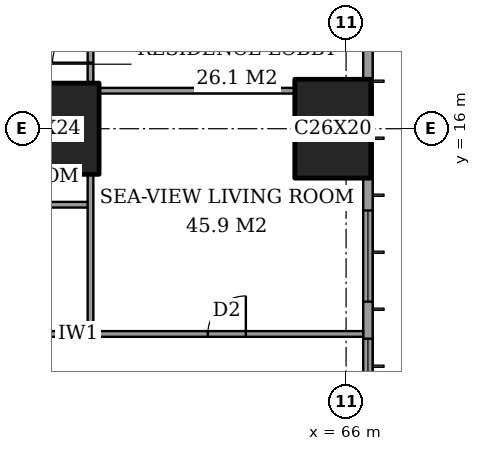
"""IFC4 building model, lengths in metres.
Left out: names, types, materials, properties, quantities, classifications, styles, units other than length and angle.
Written with IfcOpenShell. Run it as: python <this file> out.ifc"""

import sys

from ifc_helpers import new_model, si_unit, direction, frame, frame_2d, origin, origin_2d, place, context, subcontext, project, spatial, rectangle, extrude, element, fill, save


model = new_model("IFC4")
c1 = context("Model", 3, precision=1e-05, world=origin(), true_north=direction((0.0, 1.0)))
c2 = subcontext(c1, "Body", "Model", "MODEL_VIEW")
j1 = project(units=[si_unit("LENGTHUNIT", "METRE"), si_unit("PLANEANGLEUNIT", "RADIAN")], contexts=[c1])
p1 = place(None, origin())
s1 = spatial("IfcSite", under=j1, at=p1, CompositionType="ELEMENT")
p2 = place(p1, origin())
s2 = spatial("IfcBuilding", under=s1, at=p2, CompositionType="ELEMENT")
p3 = place(p2, frame((0.0, 0.0, 83.6)))
s3 = spatial("IfcBuildingStorey", under=s2, at=p3, CompositionType="ELEMENT", Elevation=83.6)
p4 = place(p3, frame((58.0, 16.0, 0.0), z_axis=(0.0, 0.0, 1.0), x_axis=(1.0, 0.0, 0.0)))
e1 = element("IfcColumn", 1, at=p4, inside=s3, PredefinedType="COLUMN", context=c2, shape_type="SweptSolid", body=[
    extrude(rectangle(XDim=3.0, YDim=2.4, at=origin_2d()), origin(), (0.0, 0.0, 1.0), 3.6),
])
p5 = place(p3, frame((65.65, 16.0, 0.0), z_axis=(0.0, 0.0, 1.0), x_axis=(0.0, 1.0, 0.0)))
e2 = element("IfcColumn", 2, at=p5, inside=s3, PredefinedType="COLUMN", context=c2, shape_type="SweptSolid", body=[
    extrude(rectangle(XDim=2.6, YDim=2.0, at=origin_2d()), origin(), (0.0, 0.0, 1.0), 3.6),
])
p6 = place(p3, frame((66.575, 3.175, 0.0), z_axis=(0.0, 0.0, 1.0), x_axis=(0.0, 1.0, 0.0)))
e3 = element("IfcWall", 3, at=p6, inside=s3, PredefinedType="SOLIDWALL", context=c2, shape_type="SweptSolid", body=[
    extrude(rectangle(XDim=41.65, YDim=0.25, at=frame_2d((20.825, 0.0))), origin(), (0.0, 0.0, 1.0), 3.6),
])
p7 = place(p6, frame((0.775, 0.0, 0.6)))
e4 = element("IfcOpeningElement", 4, at=p7, cuts=e3, PredefinedType="OPENING", context=c2, shape_type="SweptSolid", body=[
    extrude(rectangle(XDim=2.4, YDim=2.0, at=frame_2d((1.2, 1.0))), frame((0.0, 0.135, 0.0), z_axis=(0.0, -1.0, 0.0), x_axis=(1.0, 0.0, 0.0)), (0.0, 0.0, 1.0), 0.27),
])
p8 = place(p6, frame((6.1, 0.0, 0.6)))
e5 = element("IfcOpeningElement", 5, at=p8, cuts=e3, PredefinedType="OPENING", context=c2, shape_type="SweptSolid", body=[
    extrude(rectangle(XDim=1.2, YDim=2.0, at=frame_2d((0.6, 1.0))), frame((0.0, 0.135, 0.0), z_axis=(0.0, -1.0, 0.0), x_axis=(1.0, 0.0, 0.0)), (0.0, 0.0, 1.0), 0.27),
])
p9 = place(p6, frame((8.275, 0.0, 0.6)))
e6 = element("IfcOpeningElement", 6, at=p9, cuts=e3, PredefinedType="OPENING", context=c2, shape_type="SweptSolid", body=[
    extrude(rectangle(XDim=2.4, YDim=2.0, at=frame_2d((1.2, 1.0))), frame((0.0, 0.135, 0.0), z_axis=(0.0, -1.0, 0.0), x_axis=(1.0, 0.0, 0.0)), (0.0, 0.0, 1.0), 0.27),
])
p10 = place(p6, frame((15.775, 0.0, 0.6)))
e7 = element("IfcOpeningElement", 7, at=p10, cuts=e3, PredefinedType="OPENING", context=c2, shape_type="SweptSolid", body=[
    extrude(rectangle(XDim=2.4, YDim=2.0, at=frame_2d((1.2, 1.0))), frame((0.0, 0.135, 0.0), z_axis=(0.0, -1.0, 0.0), x_axis=(1.0, 0.0, 0.0)), (0.0, 0.0, 1.0), 0.27),
])
p11 = place(p6, frame((23.475, 0.0, 0.6)))
e8 = element("IfcOpeningElement", 8, at=p11, cuts=e3, PredefinedType="OPENING", context=c2, shape_type="SweptSolid", body=[
    extrude(rectangle(XDim=2.4, YDim=2.0, at=frame_2d((1.2, 1.0))), frame((0.0, 0.135, 0.0), z_axis=(0.0, -1.0, 0.0), x_axis=(1.0, 0.0, 0.0)), (0.0, 0.0, 1.0), 0.27),
])
p12 = place(p6, frame((30.975, 0.0, 0.6)))
e9 = element("IfcOpeningElement", 9, at=p12, cuts=e3, PredefinedType="OPENING", context=c2, shape_type="SweptSolid", body=[
    extrude(rectangle(XDim=2.4, YDim=2.0, at=frame_2d((1.2, 1.0))), frame((0.0, 0.135, 0.0), z_axis=(0.0, -1.0, 0.0), x_axis=(1.0, 0.0, 0.0)), (0.0, 0.0, 1.0), 0.27),
])
p13 = place(p6, frame((34.5, 0.0, 0.6)))
e10 = element("IfcOpeningElement", 10, at=p13, cuts=e3, PredefinedType="OPENING", context=c2, shape_type="SweptSolid", body=[
    extrude(rectangle(XDim=1.2, YDim=2.0, at=frame_2d((0.6, 1.0))), frame((0.0, 0.135, 0.0), z_axis=(0.0, -1.0, 0.0), x_axis=(1.0, 0.0, 0.0)), (0.0, 0.0, 1.0), 0.27),
])
p14 = place(p6, frame((38.475, 0.0, 0.6)))
e11 = element("IfcOpeningElement", 11, at=p14, cuts=e3, PredefinedType="OPENING", context=c2, shape_type="SweptSolid", body=[
    extrude(rectangle(XDim=2.4, YDim=2.0, at=frame_2d((1.2, 1.0))), frame((0.0, 0.135, 0.0), z_axis=(0.0, -1.0, 0.0), x_axis=(1.0, 0.0, 0.0)), (0.0, 0.0, 1.0), 0.27),
])
p15 = place(p3, frame((41.439, 10.6, 0.0), z_axis=(0.0, 0.0, 1.0), x_axis=(1.0, 0.0, 0.0)))
e12 = element("IfcWall", 12, at=p15, inside=s3, PredefinedType="PARTITIONING", context=c2, shape_type="SweptSolid", body=[
    extrude(rectangle(XDim=25.011, YDim=0.15, at=frame_2d((12.505, 0.0))), origin(), (0.0, 0.0, 1.0), 3.35),
])
p16 = place(p15, frame((10.761, 0.0, 0.0)))
e13 = element("IfcOpeningElement", 13, at=p16, cuts=e12, PredefinedType="OPENING", context=c2, shape_type="SweptSolid", body=[
    extrude(rectangle(XDim=1.0, YDim=2.1, at=frame_2d((0.5, 1.05))), frame((0.0, 0.085, 0.0), z_axis=(0.0, -1.0, 0.0), x_axis=(1.0, 0.0, 0.0)), (0.0, 0.0, 1.0), 0.17),
])
p17 = place(p15, frame((20.924, 0.0, 0.0)))
e14 = element("IfcOpeningElement", 14, at=p17, cuts=e12, PredefinedType="OPENING", context=c2, shape_type="SweptSolid", body=[
    extrude(rectangle(XDim=1.0, YDim=2.1, at=frame_2d((0.5, 1.05))), frame((0.0, 0.085, 0.0), z_axis=(0.0, -1.0, 0.0), x_axis=(1.0, 0.0, 0.0)), (0.0, 0.0, 1.0), 0.17),
])
p18 = place(p15, frame((15.749, 0.0, 0.0)))
e15 = element("IfcOpeningElement", 15, at=p18, cuts=e12, PredefinedType="OPENING", context=c2, shape_type="SweptSolid", body=[
    extrude(rectangle(XDim=0.9, YDim=2.1, at=frame_2d((0.45, 1.05))), frame((0.0, 0.085, 0.0), z_axis=(0.0, -1.0, 0.0), x_axis=(1.0, 0.0, 0.0)), (0.0, 0.0, 1.0), 0.17),
])
p19 = place(p15, frame((12.961, 0.0, 0.0)))
e16 = element("IfcOpeningElement", 16, at=p19, cuts=e12, PredefinedType="OPENING", context=c2, shape_type="SweptSolid", body=[
    extrude(rectangle(XDim=1.0, YDim=2.1, at=frame_2d((0.5, 1.05))), frame((0.0, 0.085, 0.0), z_axis=(0.0, -1.0, 0.0), x_axis=(1.0, 0.0, 0.0)), (0.0, 0.0, 1.0), 0.17),
])
p20 = place(p15, frame((7.861, 0.0, 0.0)))
e17 = element("IfcOpeningElement", 17, at=p20, cuts=e12, PredefinedType="OPENING", context=c2, shape_type="SweptSolid", body=[
    extrude(rectangle(XDim=1.0, YDim=2.1, at=frame_2d((0.5, 1.05))), frame((0.0, 0.085, 0.0), z_axis=(0.0, -1.0, 0.0), x_axis=(1.0, 0.0, 0.0)), (0.0, 0.0, 1.0), 0.17),
])
p21 = place(p15, frame((2.836, 0.0, 0.0)))
e18 = element("IfcOpeningElement", 18, at=p21, cuts=e12, PredefinedType="OPENING", context=c2, shape_type="SweptSolid", body=[
    extrude(rectangle(XDim=1.0, YDim=2.1, at=frame_2d((0.5, 1.05))), frame((0.0, 0.085, 0.0), z_axis=(0.0, -1.0, 0.0), x_axis=(1.0, 0.0, 0.0)), (0.0, 0.0, 1.0), 0.17),
])
p22 = place(p3, frame((56.0, 14.0, 0.0), z_axis=(0.0, 0.0, 1.0), x_axis=(1.0, 0.0, 0.0)))
e19 = element("IfcWall", 19, at=p22, inside=s3, PredefinedType="PARTITIONING", context=c2, shape_type="SweptSolid", body=[
    extrude(rectangle(XDim=3.275, YDim=0.15, at=frame_2d((1.637, 0.0))), origin(), (0.0, 0.0, 1.0), 3.35),
])
p23 = place(p3, frame((59.5, 17.0, 0.0), z_axis=(0.0, 0.0, 1.0), x_axis=(1.0, 0.0, 0.0)))
e20 = element("IfcWall", 20, at=p23, inside=s3, PredefinedType="PARTITIONING", context=c2, shape_type="SweptSolid", body=[
    extrude(rectangle(XDim=5.15, YDim=0.15, at=frame_2d((2.575, 0.0))), origin(), (0.0, 0.0, 1.0), 3.35),
])
p24 = place(p3, frame((59.275, 10.6, 0.0), z_axis=(0.0, 0.0, 1.0), x_axis=(0.0, 1.0, 0.0)))
e21 = element("IfcWall", 21, at=p24, inside=s3, PredefinedType="PARTITIONING", context=c2, shape_type="SweptSolid", body=[
    extrude(rectangle(XDim=4.2, YDim=0.15, at=frame_2d((2.1, 0.0))), origin(), (0.0, 0.0, 1.0), 3.35),
])
p25 = place(p3, frame((59.275, 17.2, 0.0), z_axis=(0.0, 0.0, 1.0), x_axis=(0.0, 1.0, 0.0)))
e22 = element("IfcWall", 22, at=p25, inside=s3, PredefinedType="PARTITIONING", context=c2, shape_type="SweptSolid", body=[
    extrude(rectangle(XDim=2.45, YDim=0.15, at=frame_2d((1.225, 0.0))), origin(), (0.0, 0.0, 1.0), 3.35),
])
p26 = place(p25, frame((0.538, 0.0, 0.0)))
e23 = element("IfcOpeningElement", 23, at=p26, cuts=e22, PredefinedType="OPENING", context=c2, shape_type="SweptSolid", body=[
    extrude(rectangle(XDim=1.0, YDim=2.1, at=frame_2d((0.5, 1.05))), frame((0.0, 0.085, 0.0), z_axis=(0.0, -1.0, 0.0), x_axis=(1.0, 0.0, 0.0)), (0.0, 0.0, 1.0), 0.17),
])
p27 = place(p8, origin())
e24 = element("IfcWindow", 24, at=p27, inside=s3, PartitioningType="SINGLE_PANEL", PredefinedType="WINDOW", context=c2, shape_type="SweptSolid", body=[
    extrude(rectangle(XDim=1.2, YDim=2.0, at=frame_2d((0.6, 1.0))), frame((0.0, 0.03, 0.0), z_axis=(0.0, -1.0, 0.0), x_axis=(1.0, 0.0, 0.0)), (0.0, 0.0, 1.0), 0.06),
])
fill(e5, e24)
p28 = place(p9, origin())
e25 = element("IfcWindow", 25, at=p28, inside=s3, PartitioningType="SINGLE_PANEL", PredefinedType="WINDOW", context=c2, shape_type="SweptSolid", body=[
    extrude(rectangle(XDim=2.4, YDim=2.0, at=frame_2d((1.2, 1.0))), frame((0.0, 0.03, 0.0), z_axis=(0.0, -1.0, 0.0), x_axis=(1.0, 0.0, 0.0)), (0.0, 0.0, 1.0), 0.06),
])
fill(e6, e25)
p29 = place(p17, origin())
e26 = element("IfcDoor", 26, at=p29, inside=s3, OperationType="SINGLE_SWING_LEFT", PredefinedType="DOOR", context=c2, shape_type="SweptSolid", body=[
    extrude(rectangle(XDim=1.0, YDim=2.1, at=frame_2d((0.5, 1.05))), frame((0.0, 0.025, 0.0), z_axis=(0.0, -1.0, 0.0), x_axis=(1.0, 0.0, 0.0)), (0.0, 0.0, 1.0), 0.05),
])
fill(e14, e26)
p30 = place(p26, origin())
e27 = element("IfcDoor", 27, at=p30, inside=s3, OperationType="SINGLE_SWING_RIGHT", PredefinedType="DOOR", context=c2, shape_type="SweptSolid", body=[
    extrude(rectangle(XDim=1.0, YDim=2.1, at=frame_2d((0.5, 1.05))), frame((0.0, 0.025, 0.0), z_axis=(0.0, -1.0, 0.0), x_axis=(1.0, 0.0, 0.0)), (0.0, 0.0, 1.0), 0.05),
])
fill(e23, e27)
save(model, sys.argv[1])
